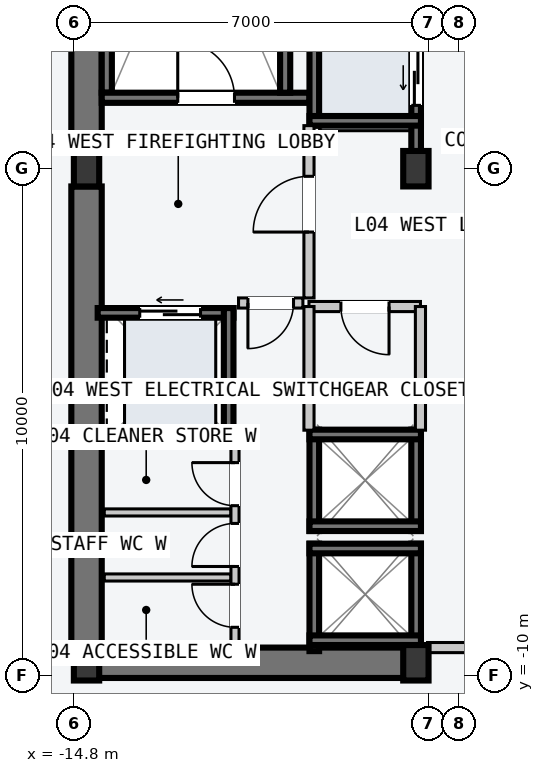
"""IFC4 building model, lengths in metres.
Left out: names, types, materials, properties, quantities, classifications, styles, units other than length and angle.
Written with IfcOpenShell. Run it as: python <this file> out.ifc"""

import sys

from ifc_helpers import new_model, si_unit, direction, frame, frame_2d, origin, origin_2d, place, context, subcontext, project, spatial, rectangle, i_section, extrude, element, fill, save


model = new_model("IFC4")
c1 = context("Model", 3, precision=1e-05, world=origin(), true_north=direction((0.0, 1.0)))
c2 = subcontext(c1, "Body", "Model", "MODEL_VIEW")
j1 = project(units=[si_unit("LENGTHUNIT", "METRE"), si_unit("PLANEANGLEUNIT", "RADIAN")], contexts=[c1])
p1 = place(None, origin())
s1 = spatial("IfcSite", under=j1, at=p1, CompositionType="ELEMENT")
p2 = place(p1, origin())
s2 = spatial("IfcBuilding", under=s1, at=p2, CompositionType="ELEMENT")
p3 = place(p2, frame((0.0, 0.0, 19.2)))
s3 = spatial("IfcBuildingStorey", under=s2, at=p3, CompositionType="ELEMENT", Elevation=19.2)
p4 = place(p3, frame((-14.53, -9.75, -0.22), z_axis=(0.0, 0.0, 1.0), x_axis=(1.0, 0.0, 0.0)))
e1 = element("IfcWall", 1, at=p4, inside=s3, PredefinedType="SHEAR", context=c2, shape_type="SweptSolid", body=[
    extrude(rectangle(XDim=6.46, YDim=0.6, at=frame_2d((3.23, 0.0))), origin(), (0.0, 0.0, 1.0), 4.82),
])
for number, where, z_axis, x_axis in (
    (2, (-14.55, -9.4, -0.22), (0.0, 0.0, 1.0), (0.0, 1.0, 0.0)),
    (3, (-14.55, 0.35, -0.22), (0.0, 0.0, 1.0), (0.0, 1.0, 0.0)),
):
    element("IfcWall", number, at=place(p3, frame(where, z_axis=z_axis, x_axis=x_axis)), inside=s3, PredefinedType="SHEAR", context=c2, shape_type="SweptSolid", body=[
        extrude(rectangle(XDim=9.05, YDim=0.6, at=frame_2d((4.525, 0.0))), origin(), (0.0, 0.0, 1.0), 4.82),
    ])
p5 = place(p3, frame((-14.15, 1.5, -0.22), z_axis=(0.0, 0.0, 1.0), x_axis=(0.0, 1.0, 0.0)))
e4 = element("IfcWall", 4, at=p5, inside=s3, PredefinedType="SOLIDWALL", context=c2, shape_type="SweptSolid", body=[
    extrude(rectangle(XDim=7.8, YDim=0.2, at=frame_2d((3.9, 0.0))), origin(), (0.0, 0.0, 1.0), 4.82),
])
p6 = place(p3, frame((-14.25, 1.4, -0.22), z_axis=(0.0, 0.0, 1.0), x_axis=(1.0, 0.0, 0.0)))
e5 = element("IfcWall", 5, at=p6, inside=s3, PredefinedType="SOLIDWALL", context=c2, shape_type="SweptSolid", body=[
    extrude(rectangle(XDim=4.1, YDim=0.2, at=frame_2d((2.05, 0.0))), origin(), (0.0, 0.0, 1.0), 4.82),
])
p7 = place(p6, frame((1.5, 0.0, 0.22)))
e6 = element("IfcOpeningElement", 6, at=p7, cuts=e5, PredefinedType="OPENING", context=c2, shape_type="SweptSolid", body=[
    extrude(rectangle(XDim=1.12, YDim=2.18, at=frame_2d((0.56, 1.09))), frame((0.0, 0.11, 0.0), z_axis=(0.0, -1.0, 0.0), x_axis=(1.0, 0.0, 0.0)), (0.0, 0.0, 1.0), 0.22),
])
p8 = place(p3, frame((-10.63, 1.5, -0.22), z_axis=(0.0, 0.0, 1.0), x_axis=(0.0, 1.0, 0.0)))
e7 = element("IfcWall", 7, at=p8, inside=s3, PredefinedType="SOLIDWALL", context=c2, shape_type="SweptSolid", body=[
    extrude(rectangle(XDim=7.8, YDim=0.2, at=frame_2d((3.9, 0.0))), origin(), (0.0, 0.0, 1.0), 4.82),
])
for number, where, z_axis, x_axis in (
    (8, (-14.55, -9.75, 0.0), (0.0, 0.0, 1.0), (1.0, 0.0, 0.0)),
    (9, (-14.55, 0.0, 0.0), (0.0, 0.0, 1.0), (1.0, 0.0, 0.0)),
    (10, (-8.05, -9.75, 0.0), (0.0, 0.0, 1.0), (1.0, 0.0, 0.0)),
    (11, (-8.05, 0.0, 0.0), (0.0, 0.0, 1.0), (1.0, 0.0, 0.0)),
):
    element("IfcColumn", number, at=place(p3, frame(where, z_axis=z_axis, x_axis=x_axis)), inside=s3, PredefinedType="COLUMN", context=c2, shape_type="SweptSolid", body=[
        extrude(i_section(OverallWidth=0.5, OverallDepth=0.7, WebThickness=0.028, FlangeThickness=0.045, at=origin_2d()), origin(), (0.0, 0.0, 1.0), 4.8),
    ])
p9 = place(p3, frame((-8.045, 0.21, -0.22), z_axis=(0.0, 0.0, 1.0), x_axis=(0.0, 1.0, 0.0)))
e12 = element("IfcWall", 12, at=p9, inside=s3, PredefinedType="SOLIDWALL", context=c2, shape_type="SweptSolid", body=[
    extrude(rectangle(XDim=2.54, YDim=0.19, at=frame_2d((1.27, 0.0))), origin(), (0.0, 0.0, 1.0), 4.82),
])
p10 = place(p9, frame((1.04, 0.0, 0.22)))
e13 = element("IfcOpeningElement", 13, at=p10, cuts=e12, PredefinedType="OPENING", context=c2, shape_type="SweptSolid", body=[
    extrude(rectangle(XDim=1.1, YDim=2.2, at=frame_2d((0.55, 1.1))), frame((0.0, 0.105, 0.0), z_axis=(0.0, -1.0, 0.0), x_axis=(1.0, 0.0, 0.0)), (0.0, 0.0, 1.0), 0.21),
])
p11 = place(p3, frame((-10.055, 0.85, -0.22), z_axis=(0.0, 0.0, 1.0), x_axis=(0.0, 1.0, 0.0)))
e14 = element("IfcWall", 14, at=p11, inside=s3, PredefinedType="SOLIDWALL", context=c2, shape_type="SweptSolid", body=[
    extrude(rectangle(XDim=1.9, YDim=0.19, at=frame_2d((0.95, 0.0))), origin(), (0.0, 0.0, 1.0), 4.82),
])
p12 = place(p3, frame((-10.15, 0.945, -0.22), z_axis=(0.0, 0.0, 1.0), x_axis=(1.0, 0.0, 0.0)))
e15 = element("IfcWall", 15, at=p12, inside=s3, PredefinedType="SOLIDWALL", context=c2, shape_type="SweptSolid", body=[
    extrude(rectangle(XDim=2.2, YDim=0.19, at=frame_2d((1.1, 0.0))), origin(), (0.0, 0.0, 1.0), 4.82),
])
for number, where, z_axis, x_axis in (
    (16, (-8.045, -9.52, -0.22), (0.0, 0.0, 1.0), (0.0, 1.0, 0.0)),
    (17, (-10.055, -9.52, -0.22), (0.0, 0.0, 1.0), (0.0, 1.0, 0.0)),
):
    element("IfcWall", number, at=place(p3, frame(where, z_axis=z_axis, x_axis=x_axis)), inside=s3, PredefinedType="SOLIDWALL", context=c2, shape_type="SweptSolid", body=[
        extrude(rectangle(XDim=2.12, YDim=0.19, at=frame_2d((1.06, 0.0))), origin(), (0.0, 0.0, 1.0), 4.82),
    ])
for number, where, z_axis, x_axis in (
    (18, (-10.15, -7.495, -0.22), (0.0, 0.0, 1.0), (1.0, 0.0, 0.0)),
    (19, (-10.15, -9.305, -0.22), (0.0, 0.0, 1.0), (1.0, 0.0, 0.0)),
):
    element("IfcWall", number, at=place(p3, frame(where, z_axis=z_axis, x_axis=x_axis)), inside=s3, PredefinedType="SOLIDWALL", context=c2, shape_type="SweptSolid", body=[
        extrude(rectangle(XDim=2.2, YDim=0.19, at=frame_2d((1.1, 0.0))), origin(), (0.0, 0.0, 1.0), 4.82),
    ])
for number, where, z_axis, x_axis in (
    (20, (-8.045, -7.15, -0.22), (0.0, 0.0, 1.0), (0.0, 1.0, 0.0)),
    (21, (-10.055, -7.15, -0.22), (0.0, 0.0, 1.0), (0.0, 1.0, 0.0)),
):
    element("IfcWall", number, at=place(p3, frame(where, z_axis=z_axis, x_axis=x_axis)), inside=s3, PredefinedType="SOLIDWALL", context=c2, shape_type="SweptSolid", body=[
        extrude(rectangle(XDim=2.0, YDim=0.19, at=frame_2d((1.0, 0.0))), origin(), (0.0, 0.0, 1.0), 4.82),
    ])
for number, where, z_axis, x_axis in (
    (22, (-10.15, -5.245, -0.22), (0.0, 0.0, 1.0), (1.0, 0.0, 0.0)),
    (23, (-10.15, -7.055, -0.22), (0.0, 0.0, 1.0), (1.0, 0.0, 0.0)),
):
    element("IfcWall", number, at=place(p3, frame(where, z_axis=z_axis, x_axis=x_axis)), inside=s3, PredefinedType="SOLIDWALL", context=c2, shape_type="SweptSolid", body=[
        extrude(rectangle(XDim=2.2, YDim=0.19, at=frame_2d((1.1, 0.0))), origin(), (0.0, 0.0, 1.0), 4.82),
    ])
p13 = place(p3, frame((-14.33, -2.845, -0.22), z_axis=(0.0, 0.0, 1.0), x_axis=(1.0, 0.0, 0.0)))
e24 = element("IfcWall", 24, at=p13, inside=s3, PredefinedType="SOLIDWALL", context=c2, shape_type="SweptSolid", body=[
    extrude(rectangle(XDim=2.68, YDim=0.19, at=frame_2d((1.34, 0.0))), origin(), (0.0, 0.0, 1.0), 4.82),
])
p14 = place(p13, frame((0.83, 0.0, 0.22)))
e25 = element("IfcOpeningElement", 25, at=p14, cuts=e24, PredefinedType="OPENING", context=c2, shape_type="SweptSolid", body=[
    extrude(rectangle(XDim=1.2, YDim=2.2, at=frame_2d((0.6, 1.1))), frame((0.0, 0.105, 0.0), z_axis=(0.0, -1.0, 0.0), x_axis=(1.0, 0.0, 0.0)), (0.0, 0.0, 1.0), 0.21),
])
p15 = place(p3, frame((-14.33, -5.255, -0.22), z_axis=(0.0, 0.0, 1.0), x_axis=(1.0, 0.0, 0.0)))
e26 = element("IfcWall", 26, at=p15, inside=s3, PredefinedType="SOLIDWALL", context=c2, shape_type="SweptSolid", body=[
    extrude(rectangle(XDim=2.68, YDim=0.19, at=frame_2d((1.34, 0.0))), origin(), (0.0, 0.0, 1.0), 4.82),
])
p16 = place(p3, frame((-11.745, -5.35, -0.22), z_axis=(0.0, 0.0, 1.0), x_axis=(0.0, 1.0, 0.0)))
e27 = element("IfcWall", 27, at=p16, inside=s3, PredefinedType="SOLIDWALL", context=c2, shape_type="SweptSolid", body=[
    extrude(rectangle(XDim=2.6, YDim=0.19, at=frame_2d((1.3, 0.0))), origin(), (0.0, 0.0, 1.0), 4.82),
])
p17 = place(p3, frame((-6.02, -9.45, 0.0), z_axis=(0.0, 0.0, 1.0), x_axis=(-1.0, 0.0, 0.0)))
e28 = element("IfcWall", 28, at=p17, inside=s3, PredefinedType="PARTITIONING", context=c2, shape_type="SweptSolid", body=[
    extrude(rectangle(XDim=1.8, YDim=0.2, at=frame_2d((0.9, 0.0))), origin(), (0.0, 0.0, 1.0), 2.92),
])
p18 = place(p3, frame((-10.16, -2.55, 0.0), z_axis=(0.0, 0.0, 1.0), x_axis=(0.0, 1.0, 0.0)))
e29 = element("IfcWall", 29, at=p18, inside=s3, PredefinedType="PARTITIONING", context=c2, shape_type="SweptSolid", body=[
    extrude(rectangle(XDim=3.4, YDim=0.2, at=frame_2d((1.7, 0.0))), origin(), (0.0, 0.0, 1.0), 4.6),
])
p19 = place(p18, frame((1.3, 0.0, 0.0)))
e30 = element("IfcOpeningElement", 30, at=p19, cuts=e29, PredefinedType="OPENING", context=c2, shape_type="SweptSolid", body=[
    extrude(rectangle(XDim=1.1, YDim=2.15, at=frame_2d((0.55, 1.075))), frame((0.0, 0.11, 0.0), z_axis=(0.0, -1.0, 0.0), x_axis=(1.0, 0.0, 0.0)), (0.0, 0.0, 1.0), 0.22),
])
p20 = place(p3, frame((-10.28, -2.65, 0.0), z_axis=(0.0, 0.0, 1.0), x_axis=(-1.0, 0.0, 0.0)))
e31 = element("IfcWall", 31, at=p20, inside=s3, PredefinedType="PARTITIONING", context=c2, shape_type="SweptSolid", body=[
    extrude(rectangle(XDim=1.27, YDim=0.2, at=frame_2d((0.635, 0.0))), origin(), (0.0, 0.0, 1.0), 4.6),
])
p21 = place(p20, frame((0.185, 0.0, 0.0)))
e32 = element("IfcOpeningElement", 32, at=p21, cuts=e31, PredefinedType="OPENING", context=c2, shape_type="SweptSolid", body=[
    extrude(rectangle(XDim=0.9, YDim=2.15, at=frame_2d((0.45, 1.075))), frame((0.0, 0.11, 0.0), z_axis=(0.0, -1.0, 0.0), x_axis=(1.0, 0.0, 0.0)), (0.0, 0.0, 1.0), 0.22),
])
p22 = place(p3, frame((-7.96, -2.72, 0.0), z_axis=(0.0, 0.0, 1.0), x_axis=(-1.0, 0.0, 0.0)))
e33 = element("IfcWall", 33, at=p22, inside=s3, PredefinedType="PARTITIONING", context=c2, shape_type="SweptSolid", body=[
    extrude(rectangle(XDim=2.2, YDim=0.2, at=frame_2d((1.1, 0.0))), origin(), (0.0, 0.0, 1.0), 4.6),
])
p23 = place(p22, frame((0.62, 0.0, 0.0)))
e34 = element("IfcOpeningElement", 34, at=p23, cuts=e33, PredefinedType="OPENING", context=c2, shape_type="SweptSolid", body=[
    extrude(rectangle(XDim=0.95, YDim=2.1, at=frame_2d((0.475, 1.05))), frame((0.0, 0.11, 0.0), z_axis=(0.0, -1.0, 0.0), x_axis=(1.0, 0.0, 0.0)), (0.0, 0.0, 1.0), 0.22),
])
for number, where, z_axis, x_axis in (
    (35, (-7.96, -5.16, 0.0), (0.0, 0.0, 1.0), (0.0, 1.0, 0.0)),
    (36, (-10.16, -5.16, 0.0), (0.0, 0.0, 1.0), (0.0, 1.0, 0.0)),
):
    element("IfcWall", number, at=place(p3, frame(where, z_axis=z_axis, x_axis=x_axis)), inside=s3, PredefinedType="PARTITIONING", context=c2, shape_type="SweptSolid", body=[
        extrude(rectangle(XDim=2.44, YDim=0.2, at=frame_2d((1.22, 0.0))), origin(), (0.0, 0.0, 1.0), 4.6),
    ])
for number, where, z_axis, x_axis in (
    (37, (-11.7, -8.067, 0.0), (0.0, 0.0, 1.0), (-1.0, 0.0, 0.0)),
    (38, (-11.7, -6.783, 0.0), (0.0, 0.0, 1.0), (-1.0, 0.0, 0.0)),
):
    element("IfcWall", number, at=place(p3, frame(where, z_axis=z_axis, x_axis=x_axis)), inside=s3, PredefinedType="PARTITIONING", context=c2, shape_type="SweptSolid", body=[
        extrude(rectangle(XDim=2.5, YDim=0.14, at=frame_2d((1.25, 0.0))), origin(), (0.0, 0.0, 1.0), 4.6),
    ])
p24 = place(p3, frame((-11.62, -9.35, 0.0), z_axis=(0.0, 0.0, 1.0), x_axis=(0.0, 1.0, 0.0)))
e39 = element("IfcWall", 39, at=p24, inside=s3, PredefinedType="PARTITIONING", context=c2, shape_type="SweptSolid", body=[
    extrude(rectangle(XDim=3.85, YDim=0.16, at=frame_2d((1.925, 0.0))), origin(), (0.0, 0.0, 1.0), 4.6),
])
p25 = place(p24, frame((0.3, 0.0, 0.0)))
e40 = element("IfcOpeningElement", 40, at=p25, cuts=e39, PredefinedType="OPENING", context=c2, shape_type="SweptSolid", body=[
    extrude(rectangle(XDim=0.85, YDim=2.12, at=frame_2d((0.425, 1.06))), frame((0.0, 0.09, 0.0), z_axis=(0.0, -1.0, 0.0), x_axis=(1.0, 0.0, 0.0)), (0.0, 0.0, 1.0), 0.18),
])
p26 = place(p24, frame((1.5, 0.0, 0.0)))
e41 = element("IfcOpeningElement", 41, at=p26, cuts=e39, PredefinedType="OPENING", context=c2, shape_type="SweptSolid", body=[
    extrude(rectangle(XDim=0.85, YDim=2.12, at=frame_2d((0.425, 1.06))), frame((0.0, 0.09, 0.0), z_axis=(0.0, -1.0, 0.0), x_axis=(1.0, 0.0, 0.0)), (0.0, 0.0, 1.0), 0.18),
])
p27 = place(p24, frame((2.7, 0.0, 0.0)))
e42 = element("IfcOpeningElement", 42, at=p27, cuts=e39, PredefinedType="OPENING", context=c2, shape_type="SweptSolid", body=[
    extrude(rectangle(XDim=0.85, YDim=2.12, at=frame_2d((0.425, 1.06))), frame((0.0, 0.09, 0.0), z_axis=(0.0, -1.0, 0.0), x_axis=(1.0, 0.0, 0.0)), (0.0, 0.0, 1.0), 0.18),
])
p28 = place(p7, origin())
e43 = element("IfcDoor", 43, at=p28, inside=s3, OperationType="SINGLE_SWING_LEFT", PredefinedType="DOOR", context=c2, shape_type="SweptSolid", body=[
    extrude(rectangle(XDim=1.12, YDim=2.18, at=frame_2d((0.56, 1.09))), frame((0.0, 0.025, 0.0), z_axis=(0.0, -1.0, 0.0), x_axis=(1.0, 0.0, 0.0)), (0.0, 0.0, 1.0), 0.05),
])
fill(e6, e43)
p29 = place(p10, origin())
e44 = element("IfcDoor", 44, at=p29, inside=s3, OperationType="SLIDING_TO_LEFT", PredefinedType="DOOR", context=c2, shape_type="SweptSolid", body=[
    extrude(rectangle(XDim=1.1, YDim=2.2, at=frame_2d((0.55, 1.1))), frame((0.0, 0.025, 0.0), z_axis=(0.0, -1.0, 0.0), x_axis=(1.0, 0.0, 0.0)), (0.0, 0.0, 1.0), 0.05),
])
fill(e13, e44)
p30 = place(p14, origin())
e45 = element("IfcDoor", 45, at=p30, inside=s3, OperationType="SLIDING_TO_LEFT", PredefinedType="DOOR", context=c2, shape_type="SweptSolid", body=[
    extrude(rectangle(XDim=1.2, YDim=2.2, at=frame_2d((0.6, 1.1))), frame((0.0, 0.025, 0.0), z_axis=(0.0, -1.0, 0.0), x_axis=(1.0, 0.0, 0.0)), (0.0, 0.0, 1.0), 0.05),
])
fill(e25, e45)
p31 = place(p19, origin())
e46 = element("IfcDoor", 46, at=p31, inside=s3, OperationType="SINGLE_SWING_LEFT", PredefinedType="DOOR", context=c2, shape_type="SweptSolid", body=[
    extrude(rectangle(XDim=1.1, YDim=2.15, at=frame_2d((0.55, 1.075))), frame((0.0, 0.025, 0.0), z_axis=(0.0, -1.0, 0.0), x_axis=(1.0, 0.0, 0.0)), (0.0, 0.0, 1.0), 0.05),
])
fill(e30, e46)
p32 = place(p21, origin())
e47 = element("IfcDoor", 47, at=p32, inside=s3, OperationType="SINGLE_SWING_RIGHT", PredefinedType="DOOR", context=c2, shape_type="SweptSolid", body=[
    extrude(rectangle(XDim=0.9, YDim=2.15, at=frame_2d((0.45, 1.075))), frame((0.0, 0.025, 0.0), z_axis=(0.0, -1.0, 0.0), x_axis=(1.0, 0.0, 0.0)), (0.0, 0.0, 1.0), 0.05),
])
fill(e32, e47)
p33 = place(p23, origin())
e48 = element("IfcDoor", 48, at=p33, inside=s3, OperationType="SINGLE_SWING_LEFT", PredefinedType="DOOR", context=c2, shape_type="SweptSolid", body=[
    extrude(rectangle(XDim=0.95, YDim=2.1, at=frame_2d((0.475, 1.05))), frame((0.0, 0.025, 0.0), z_axis=(0.0, -1.0, 0.0), x_axis=(1.0, 0.0, 0.0)), (0.0, 0.0, 1.0), 0.05),
])
fill(e34, e48)
p34 = place(p25, origin())
e49 = element("IfcDoor", 49, at=p34, inside=s3, OperationType="SINGLE_SWING_RIGHT", PredefinedType="DOOR", context=c2, shape_type="SweptSolid", body=[
    extrude(rectangle(XDim=0.85, YDim=2.12, at=frame_2d((0.425, 1.06))), frame((0.0, 0.025, 0.0), z_axis=(0.0, -1.0, 0.0), x_axis=(1.0, 0.0, 0.0)), (0.0, 0.0, 1.0), 0.05),
])
fill(e40, e49)
p35 = place(p26, origin())
e50 = element("IfcDoor", 50, at=p35, inside=s3, OperationType="SINGLE_SWING_LEFT", PredefinedType="DOOR", context=c2, shape_type="SweptSolid", body=[
    extrude(rectangle(XDim=0.85, YDim=2.12, at=frame_2d((0.425, 1.06))), frame((0.0, 0.025, 0.0), z_axis=(0.0, -1.0, 0.0), x_axis=(1.0, 0.0, 0.0)), (0.0, 0.0, 1.0), 0.05),
])
fill(e41, e50)
p36 = place(p27, origin())
e51 = element("IfcDoor", 51, at=p36, inside=s3, OperationType="SINGLE_SWING_RIGHT", PredefinedType="DOOR", context=c2, shape_type="SweptSolid", body=[
    extrude(rectangle(XDim=0.85, YDim=2.12, at=frame_2d((0.425, 1.06))), frame((0.0, 0.025, 0.0), z_axis=(0.0, -1.0, 0.0), x_axis=(1.0, 0.0, 0.0)), (0.0, 0.0, 1.0), 0.05),
])
fill(e42, e51)
save(model, sys.argv[1])
